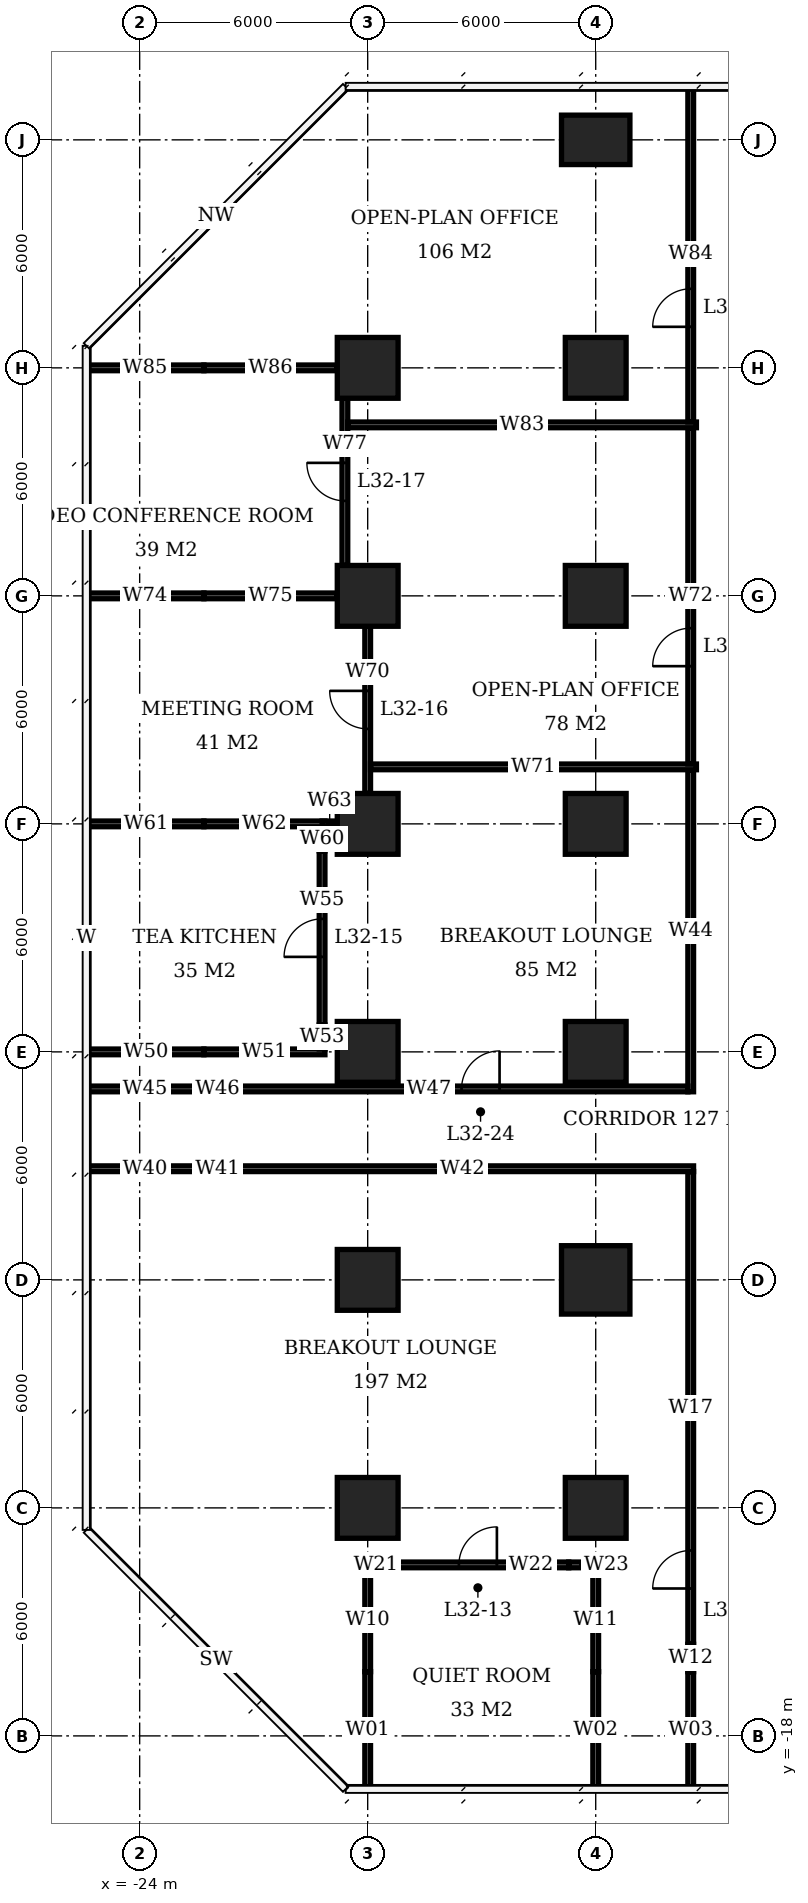
"""IFC4 building model, lengths in metres.
Left out: names, types, materials, properties, quantities, classifications, styles, units other than length and angle.
Written with IfcOpenShell. Run it as: python <this file> out.ifc"""

import sys

from ifc_helpers import new_model, si_unit, direction, frame, frame_2d, origin, origin_2d, place, context, subcontext, project, spatial, rectangle, extrude, element, fill, save


model = new_model("IFC4")
c1 = context("Model", 3, precision=1e-05, world=origin(), true_north=direction((0.0, 1.0)))
c2 = subcontext(c1, "Body", "Model", "MODEL_VIEW")
j1 = project(units=[si_unit("LENGTHUNIT", "METRE"), si_unit("PLANEANGLEUNIT", "RADIAN")], contexts=[c1])
p1 = place(None, origin())
s1 = spatial("IfcSite", under=j1, at=p1, CompositionType="ELEMENT")
p2 = place(p1, origin())
s2 = spatial("IfcBuilding", under=s1, at=p2, CompositionType="ELEMENT")
p3 = place(p2, frame((0.0, 0.0, 132.8)))
s3 = spatial("IfcBuildingStorey", under=s2, at=p3, CompositionType="ELEMENT", Elevation=132.8)
for number, where, z_axis, x_axis in (
    (1, (-18.0, -12.0, 0.0), (0.0, 0.0, 1.0), (1.0, 0.0, 0.0)),
    (2, (-18.0, -6.0, 0.0), (0.0, 0.0, 1.0), (1.0, 0.0, 0.0)),
    (3, (-18.0, 0.0, 0.0), (0.0, 0.0, 1.0), (1.0, 0.0, 0.0)),
    (4, (-18.0, 6.0, 0.0), (0.0, 0.0, 1.0), (1.0, 0.0, 0.0)),
    (5, (-18.0, 12.0, 0.0), (0.0, 0.0, 1.0), (1.0, 0.0, 0.0)),
    (6, (-18.0, 18.0, 0.0), (0.0, 0.0, 1.0), (1.0, 0.0, 0.0)),
    (7, (-12.0, -12.0, 0.0), (0.0, 0.0, 1.0), (1.0, 0.0, 0.0)),
):
    element("IfcColumn", number, at=place(p3, frame(where, z_axis=z_axis, x_axis=x_axis)), inside=s3, PredefinedType="COLUMN", context=c2, shape_type="SweptSolid", body=[
        extrude(rectangle(XDim=1.6, YDim=1.6, at=origin_2d()), origin(), (0.0, 0.0, 1.0), 3.9),
    ])
p4 = place(p3, frame((-12.0, -6.0, 0.0), z_axis=(0.0, 0.0, 1.0), x_axis=(1.0, 0.0, 0.0)))
e8 = element("IfcColumn", 8, at=p4, inside=s3, PredefinedType="COLUMN", context=c2, shape_type="SweptSolid", body=[
    extrude(rectangle(XDim=1.8, YDim=1.8, at=origin_2d()), origin(), (0.0, 0.0, 1.0), 3.9),
])
for number, where, z_axis, x_axis in (
    (9, (-12.0, 0.0, 0.0), (0.0, 0.0, 1.0), (1.0, 0.0, 0.0)),
    (10, (-12.0, 6.0, 0.0), (0.0, 0.0, 1.0), (1.0, 0.0, 0.0)),
    (11, (-12.0, 12.0, 0.0), (0.0, 0.0, 1.0), (1.0, 0.0, 0.0)),
    (12, (-12.0, 18.0, 0.0), (0.0, 0.0, 1.0), (1.0, 0.0, 0.0)),
):
    element("IfcColumn", number, at=place(p3, frame(where, z_axis=z_axis, x_axis=x_axis)), inside=s3, PredefinedType="COLUMN", context=c2, shape_type="SweptSolid", body=[
        extrude(rectangle(XDim=1.6, YDim=1.6, at=origin_2d()), origin(), (0.0, 0.0, 1.0), 3.9),
    ])
p5 = place(p3, frame((-12.0, 24.0, 0.0), z_axis=(0.0, 0.0, 1.0), x_axis=(1.0, 0.0, 0.0)))
e13 = element("IfcColumn", 13, at=p5, inside=s3, PredefinedType="COLUMN", context=c2, shape_type="SweptSolid", body=[
    extrude(rectangle(XDim=1.8, YDim=1.3, at=origin_2d()), origin(), (0.0, 0.0, 1.0), 3.9),
])
p6 = place(p3, frame((-18.075, -13.5, 0.0), z_axis=(0.0, 0.0, 1.0), x_axis=(1.0, 0.0, 0.0)))
e14 = element("IfcWall", 14, at=p6, inside=s3, PredefinedType="PARTITIONING", context=c2, shape_type="SweptSolid", body=[
    extrude(rectangle(XDim=0.585, YDim=0.15, at=frame_2d((0.292, 0.0))), origin(), (0.0, 0.0, 1.0), 2.65),
])
p7 = place(p3, frame((-17.49, -13.5, 0.0), z_axis=(0.0, 0.0, 1.0), x_axis=(1.0, 0.0, 0.0)))
e15 = element("IfcWall", 15, at=p7, inside=s3, PredefinedType="PARTITIONING", context=c2, shape_type="SweptSolid", body=[
    extrude(rectangle(XDim=4.78, YDim=0.15, at=frame_2d((2.39, 0.0))), origin(), (0.0, 0.0, 1.0), 3.65),
])
p8 = place(p7, frame((1.89, 0.0, 0.0)))
e16 = element("IfcOpeningElement", 16, at=p8, cuts=e15, PredefinedType="OPENING", context=c2, shape_type="SweptSolid", body=[
    extrude(rectangle(XDim=1.0, YDim=2.1, at=frame_2d((0.5, 1.05))), frame((0.0, 0.085, 0.0), z_axis=(0.0, -1.0, 0.0), x_axis=(1.0, 0.0, 0.0)), (0.0, 0.0, 1.0), 0.17),
])
p9 = place(p3, frame((-12.71, -13.5, 0.0), z_axis=(0.0, 0.0, 1.0), x_axis=(1.0, 0.0, 0.0)))
e17 = element("IfcWall", 17, at=p9, inside=s3, PredefinedType="PARTITIONING", context=c2, shape_type="SweptSolid", body=[
    extrude(rectangle(XDim=0.785, YDim=0.15, at=frame_2d((0.393, 0.0))), origin(), (0.0, 0.0, 1.0), 2.65),
])
p10 = place(p3, frame((-25.35, 0.0, 0.0), z_axis=(0.0, 0.0, 1.0), x_axis=(1.0, 0.0, 0.0)))
e18 = element("IfcWall", 18, at=p10, inside=s3, PredefinedType="PARTITIONING", context=c2, shape_type="SweptSolid", body=[
    extrude(rectangle(XDim=3.04, YDim=0.15, at=frame_2d((1.52, 0.0))), origin(), (0.0, 0.0, 1.0), 3.65),
])
p11 = place(p3, frame((-22.31, 0.0, 0.0), z_axis=(0.0, 0.0, 1.0), x_axis=(1.0, 0.0, 0.0)))
e19 = element("IfcWall", 19, at=p11, inside=s3, PredefinedType="PARTITIONING", context=c2, shape_type="SweptSolid", body=[
    extrude(rectangle(XDim=3.185, YDim=0.15, at=frame_2d((1.593, 0.0))), origin(), (0.0, 0.0, 1.0), 2.65),
])
p12 = place(p3, frame((-25.35, 6.0, 0.0), z_axis=(0.0, 0.0, 1.0), x_axis=(1.0, 0.0, 0.0)))
e20 = element("IfcWall", 20, at=p12, inside=s3, PredefinedType="PARTITIONING", context=c2, shape_type="SweptSolid", body=[
    extrude(rectangle(XDim=3.04, YDim=0.15, at=frame_2d((1.52, 0.0))), origin(), (0.0, 0.0, 1.0), 3.65),
])
p13 = place(p3, frame((-22.31, 6.0, 0.0), z_axis=(0.0, 0.0, 1.0), x_axis=(1.0, 0.0, 0.0)))
e21 = element("IfcWall", 21, at=p13, inside=s3, PredefinedType="PARTITIONING", context=c2, shape_type="SweptSolid", body=[
    extrude(rectangle(XDim=3.185, YDim=0.15, at=frame_2d((1.593, 0.0))), origin(), (0.0, 0.0, 1.0), 2.65),
])
p14 = place(p3, frame((-19.2, 6.0, 0.0), z_axis=(0.0, 0.0, 1.0), x_axis=(1.0, 0.0, 0.0)))
e22 = element("IfcWall", 22, at=p14, inside=s3, PredefinedType="PARTITIONING", context=c2, shape_type="SweptSolid", body=[
    extrude(rectangle(XDim=0.4, YDim=0.15, at=frame_2d((0.2, 0.0))), origin(), (0.0, 0.0, 1.0), 2.65),
])
p15 = place(p3, frame((-25.4, 12.0, 0.0), z_axis=(0.0, 0.0, 1.0), x_axis=(1.0, 0.0, 0.0)))
e23 = element("IfcWall", 23, at=p15, inside=s3, PredefinedType="PARTITIONING", context=c2, shape_type="SweptSolid", body=[
    extrude(rectangle(XDim=3.09, YDim=0.15, at=frame_2d((1.545, 0.0))), origin(), (0.0, 0.0, 1.0), 3.65),
])
p16 = place(p3, frame((-22.31, 12.0, 0.0), z_axis=(0.0, 0.0, 1.0), x_axis=(1.0, 0.0, 0.0)))
e24 = element("IfcWall", 24, at=p16, inside=s3, PredefinedType="PARTITIONING", context=c2, shape_type="SweptSolid", body=[
    extrude(rectangle(XDim=3.51, YDim=0.15, at=frame_2d((1.755, 0.0))), origin(), (0.0, 0.0, 1.0), 2.65),
])
p17 = place(p3, frame((-25.4, 18.0, 0.0), z_axis=(0.0, 0.0, 1.0), x_axis=(1.0, 0.0, 0.0)))
e25 = element("IfcWall", 25, at=p17, inside=s3, PredefinedType="PARTITIONING", context=c2, shape_type="SweptSolid", body=[
    extrude(rectangle(XDim=3.09, YDim=0.15, at=frame_2d((1.545, 0.0))), origin(), (0.0, 0.0, 1.0), 3.65),
])
p18 = place(p3, frame((-22.31, 18.0, 0.0), z_axis=(0.0, 0.0, 1.0), x_axis=(1.0, 0.0, 0.0)))
e26 = element("IfcWall", 26, at=p18, inside=s3, PredefinedType="PARTITIONING", context=c2, shape_type="SweptSolid", body=[
    extrude(rectangle(XDim=3.51, YDim=0.15, at=frame_2d((1.755, 0.0))), origin(), (0.0, 0.0, 1.0), 2.65),
])
p19 = place(p3, frame((-19.2, 0.075, 0.0), z_axis=(0.0, 0.0, 1.0), x_axis=(0.0, 1.0, 0.0)))
e27 = element("IfcWall", 27, at=p19, inside=s3, PredefinedType="PARTITIONING", context=c2, shape_type="SweptSolid", body=[
    extrude(rectangle(XDim=0.635, YDim=0.15, at=frame_2d((0.317, 0.0))), origin(), (0.0, 0.0, 1.0), 2.65),
])
p20 = place(p3, frame((-19.2, 0.71, 0.0), z_axis=(0.0, 0.0, 1.0), x_axis=(0.0, 1.0, 0.0)))
e28 = element("IfcWall", 28, at=p20, inside=s3, PredefinedType="PARTITIONING", context=c2, shape_type="SweptSolid", body=[
    extrude(rectangle(XDim=4.58, YDim=0.15, at=frame_2d((2.29, 0.0))), origin(), (0.0, 0.0, 1.0), 3.65),
])
p21 = place(p20, frame((1.79, 0.0, 0.0)))
e29 = element("IfcOpeningElement", 29, at=p21, cuts=e28, PredefinedType="OPENING", context=c2, shape_type="SweptSolid", body=[
    extrude(rectangle(XDim=1.0, YDim=2.1, at=frame_2d((0.5, 1.05))), frame((0.0, 0.085, 0.0), z_axis=(0.0, -1.0, 0.0), x_axis=(1.0, 0.0, 0.0)), (0.0, 0.0, 1.0), 0.17),
])
p22 = place(p3, frame((-19.2, 5.29, 0.0), z_axis=(0.0, 0.0, 1.0), x_axis=(0.0, 1.0, 0.0)))
e30 = element("IfcWall", 30, at=p22, inside=s3, PredefinedType="PARTITIONING", context=c2, shape_type="SweptSolid", body=[
    extrude(rectangle(XDim=0.635, YDim=0.15, at=frame_2d((0.317, 0.0))), origin(), (0.0, 0.0, 1.0), 2.65),
])
p23 = place(p3, frame((-18.6, 12.8, 0.0), z_axis=(0.0, 0.0, 1.0), x_axis=(0.0, 1.0, 0.0)))
e31 = element("IfcWall", 31, at=p23, inside=s3, PredefinedType="PARTITIONING", context=c2, shape_type="SweptSolid", body=[
    extrude(rectangle(XDim=4.4, YDim=0.15, at=frame_2d((2.2, 0.0))), origin(), (0.0, 0.0, 1.0), 3.65),
])
p24 = place(p23, frame((1.7, 0.0, 0.0)))
e32 = element("IfcOpeningElement", 32, at=p24, cuts=e31, PredefinedType="OPENING", context=c2, shape_type="SweptSolid", body=[
    extrude(rectangle(XDim=1.0, YDim=2.1, at=frame_2d((0.5, 1.05))), frame((0.0, 0.085, 0.0), z_axis=(0.0, -1.0, 0.0), x_axis=(1.0, 0.0, 0.0)), (0.0, 0.0, 1.0), 0.17),
])
p25 = place(p3, frame((-18.0, -19.4, 0.0), z_axis=(0.0, 0.0, 1.0), x_axis=(0.0, 1.0, 0.0)))
e33 = element("IfcWall", 33, at=p25, inside=s3, PredefinedType="PARTITIONING", context=c2, shape_type="SweptSolid", body=[
    extrude(rectangle(XDim=3.09, YDim=0.15, at=frame_2d((1.545, 0.0))), origin(), (0.0, 0.0, 1.0), 3.65),
])
p26 = place(p3, frame((-18.0, -16.31, 0.0), z_axis=(0.0, 0.0, 1.0), x_axis=(0.0, 1.0, 0.0)))
e34 = element("IfcWall", 34, at=p26, inside=s3, PredefinedType="PARTITIONING", context=c2, shape_type="SweptSolid", body=[
    extrude(rectangle(XDim=2.735, YDim=0.15, at=frame_2d((1.368, 0.0))), origin(), (0.0, 0.0, 1.0), 2.65),
])
p27 = place(p3, frame((-18.0, 6.8, 0.0), z_axis=(0.0, 0.0, 1.0), x_axis=(0.0, 1.0, 0.0)))
e35 = element("IfcWall", 35, at=p27, inside=s3, PredefinedType="PARTITIONING", context=c2, shape_type="SweptSolid", body=[
    extrude(rectangle(XDim=4.4, YDim=0.15, at=frame_2d((2.2, 0.0))), origin(), (0.0, 0.0, 1.0), 3.65),
])
p28 = place(p27, frame((1.7, 0.0, 0.0)))
e36 = element("IfcOpeningElement", 36, at=p28, cuts=e35, PredefinedType="OPENING", context=c2, shape_type="SweptSolid", body=[
    extrude(rectangle(XDim=1.0, YDim=2.1, at=frame_2d((0.5, 1.05))), frame((0.0, 0.085, 0.0), z_axis=(0.0, -1.0, 0.0), x_axis=(1.0, 0.0, 0.0)), (0.0, 0.0, 1.0), 0.17),
])
p29 = place(p3, frame((-12.0, -19.4, 0.0), z_axis=(0.0, 0.0, 1.0), x_axis=(0.0, 1.0, 0.0)))
e37 = element("IfcWall", 37, at=p29, inside=s3, PredefinedType="PARTITIONING", context=c2, shape_type="SweptSolid", body=[
    extrude(rectangle(XDim=3.09, YDim=0.15, at=frame_2d((1.545, 0.0))), origin(), (0.0, 0.0, 1.0), 3.65),
])
p30 = place(p3, frame((-12.0, -16.31, 0.0), z_axis=(0.0, 0.0, 1.0), x_axis=(0.0, 1.0, 0.0)))
e38 = element("IfcWall", 38, at=p30, inside=s3, PredefinedType="PARTITIONING", context=c2, shape_type="SweptSolid", body=[
    extrude(rectangle(XDim=2.735, YDim=0.15, at=frame_2d((1.368, 0.0))), origin(), (0.0, 0.0, 1.0), 2.65),
])
p31 = place(p3, frame((-25.4, -3.075, 0.0), z_axis=(0.0, 0.0, 1.0), x_axis=(1.0, 0.0, 0.0)))
e39 = element("IfcWall", 39, at=p31, inside=s3, PredefinedType="PARTITIONING", context=c2, shape_type="SweptSolid", body=[
    extrude(rectangle(XDim=3.09, YDim=0.15, at=frame_2d((1.545, 0.0))), origin(), (0.0, 0.0, 1.0), 3.65),
])
p32 = place(p3, frame((-22.31, -3.075, 0.0), z_axis=(0.0, 0.0, 1.0), x_axis=(1.0, 0.0, 0.0)))
e40 = element("IfcWall", 40, at=p32, inside=s3, PredefinedType="PARTITIONING", context=c2, shape_type="SweptSolid", body=[
    extrude(rectangle(XDim=0.72, YDim=0.15, at=frame_2d((0.36, 0.0))), origin(), (0.0, 0.0, 1.0), 2.65),
])
p33 = place(p3, frame((-21.59, -3.075, 0.0), z_axis=(0.0, 0.0, 1.0), x_axis=(1.0, 0.0, 0.0)))
e41 = element("IfcWall", 41, at=p33, inside=s3, PredefinedType="PARTITIONING", context=c2, shape_type="SweptSolid", body=[
    extrude(rectangle(XDim=12.165, YDim=0.15, at=frame_2d((6.083, 0.0))), origin(), (0.0, 0.0, 1.0), 3.65),
])
p34 = place(p3, frame((-25.4, -0.975, 0.0), z_axis=(0.0, 0.0, 1.0), x_axis=(1.0, 0.0, 0.0)))
e42 = element("IfcWall", 42, at=p34, inside=s3, PredefinedType="PARTITIONING", context=c2, shape_type="SweptSolid", body=[
    extrude(rectangle(XDim=3.09, YDim=0.15, at=frame_2d((1.545, 0.0))), origin(), (0.0, 0.0, 1.0), 3.65),
])
p35 = place(p3, frame((-22.31, -0.975, 0.0), z_axis=(0.0, 0.0, 1.0), x_axis=(1.0, 0.0, 0.0)))
e43 = element("IfcWall", 43, at=p35, inside=s3, PredefinedType="PARTITIONING", context=c2, shape_type="SweptSolid", body=[
    extrude(rectangle(XDim=0.72, YDim=0.15, at=frame_2d((0.36, 0.0))), origin(), (0.0, 0.0, 1.0), 2.65),
])
p36 = place(p3, frame((-21.59, -0.975, 0.0), z_axis=(0.0, 0.0, 1.0), x_axis=(1.0, 0.0, 0.0)))
e44 = element("IfcWall", 44, at=p36, inside=s3, PredefinedType="PARTITIONING", context=c2, shape_type="SweptSolid", body=[
    extrude(rectangle(XDim=12.015, YDim=0.15, at=frame_2d((6.008, 0.0))), origin(), (0.0, 0.0, 1.0), 3.65),
])
p37 = place(p36, frame((6.06, 0.0, 0.0)))
e45 = element("IfcOpeningElement", 45, at=p37, cuts=e44, PredefinedType="OPENING", context=c2, shape_type="SweptSolid", body=[
    extrude(rectangle(XDim=1.0, YDim=2.1, at=frame_2d((0.5, 1.05))), frame((0.0, 0.085, 0.0), z_axis=(0.0, -1.0, 0.0), x_axis=(1.0, 0.0, 0.0)), (0.0, 0.0, 1.0), 0.17),
])
p38 = place(p3, frame((-18.525, 16.5, 0.0), z_axis=(0.0, 0.0, 1.0), x_axis=(1.0, 0.0, 0.0)))
e46 = element("IfcWall", 46, at=p38, inside=s3, PredefinedType="PARTITIONING", context=c2, shape_type="SweptSolid", body=[
    extrude(rectangle(XDim=9.175, YDim=0.15, at=frame_2d((4.587, 0.0))), origin(), (0.0, 0.0, 1.0), 3.65),
])
p39 = place(p3, frame((-17.925, 7.5, 0.0), z_axis=(0.0, 0.0, 1.0), x_axis=(1.0, 0.0, 0.0)))
e47 = element("IfcWall", 47, at=p39, inside=s3, PredefinedType="PARTITIONING", context=c2, shape_type="SweptSolid", body=[
    extrude(rectangle(XDim=8.575, YDim=0.15, at=frame_2d((4.288, 0.0))), origin(), (0.0, 0.0, 1.0), 3.65),
])
p40 = place(p3, frame((-9.5, -19.4, 0.0), z_axis=(0.0, 0.0, 1.0), x_axis=(0.0, 1.0, 0.0)))
e48 = element("IfcWall", 48, at=p40, inside=s3, PredefinedType="PARTITIONING", context=c2, shape_type="SweptSolid", body=[
    extrude(rectangle(XDim=3.09, YDim=0.15, at=frame_2d((1.545, 0.0))), origin(), (0.0, 0.0, 1.0), 3.65),
])
p41 = place(p3, frame((-9.5, -16.31, 0.0), z_axis=(0.0, 0.0, 1.0), x_axis=(0.0, 1.0, 0.0)))
e49 = element("IfcWall", 49, at=p41, inside=s3, PredefinedType="PARTITIONING", context=c2, shape_type="SweptSolid", body=[
    extrude(rectangle(XDim=0.72, YDim=0.15, at=frame_2d((0.36, 0.0))), origin(), (0.0, 0.0, 1.0), 2.65),
])
p42 = place(p3, frame((-9.5, -15.59, 0.0), z_axis=(0.0, 0.0, 1.0), x_axis=(0.0, 1.0, 0.0)))
e50 = element("IfcWall", 50, at=p42, inside=s3, PredefinedType="PARTITIONING", context=c2, shape_type="SweptSolid", body=[
    extrude(rectangle(XDim=12.44, YDim=0.15, at=frame_2d((6.22, 0.0))), origin(), (0.0, 0.0, 1.0), 3.65),
])
p43 = place(p42, frame((1.469, 0.0, 0.0)))
e51 = element("IfcOpeningElement", 51, at=p43, cuts=e50, PredefinedType="OPENING", context=c2, shape_type="SweptSolid", body=[
    extrude(rectangle(XDim=1.0, YDim=2.1, at=frame_2d((0.5, 1.05))), frame((0.0, 0.085, 0.0), z_axis=(0.0, -1.0, 0.0), x_axis=(1.0, 0.0, 0.0)), (0.0, 0.0, 1.0), 0.17),
])
p44 = place(p3, frame((-9.5, -1.05, 0.0), z_axis=(0.0, 0.0, 1.0), x_axis=(0.0, 1.0, 0.0)))
e52 = element("IfcWall", 52, at=p44, inside=s3, PredefinedType="PARTITIONING", context=c2, shape_type="SweptSolid", body=[
    extrude(rectangle(XDim=8.475, YDim=0.15, at=frame_2d((4.238, 0.0))), origin(), (0.0, 0.0, 1.0), 3.65),
])
p45 = place(p3, frame((-9.5, 7.575, 0.0), z_axis=(0.0, 0.0, 1.0), x_axis=(0.0, 1.0, 0.0)))
e53 = element("IfcWall", 53, at=p45, inside=s3, PredefinedType="PARTITIONING", context=c2, shape_type="SweptSolid", body=[
    extrude(rectangle(XDim=8.85, YDim=0.15, at=frame_2d((4.425, 0.0))), origin(), (0.0, 0.0, 1.0), 3.65),
])
p46 = place(p45, frame((2.575, 0.0, 0.0)))
e54 = element("IfcOpeningElement", 54, at=p46, cuts=e53, PredefinedType="OPENING", context=c2, shape_type="SweptSolid", body=[
    extrude(rectangle(XDim=1.0, YDim=2.1, at=frame_2d((0.5, 1.05))), frame((0.0, 0.085, 0.0), z_axis=(0.0, -1.0, 0.0), x_axis=(1.0, 0.0, 0.0)), (0.0, 0.0, 1.0), 0.17),
])
p47 = place(p3, frame((-9.5, 16.575, 0.0), z_axis=(0.0, 0.0, 1.0), x_axis=(0.0, 1.0, 0.0)))
e55 = element("IfcWall", 55, at=p47, inside=s3, PredefinedType="PARTITIONING", context=c2, shape_type="SweptSolid", body=[
    extrude(rectangle(XDim=8.825, YDim=0.15, at=frame_2d((4.413, 0.0))), origin(), (0.0, 0.0, 1.0), 3.65),
])
p48 = place(p47, frame((2.505, 0.0, 0.0)))
e56 = element("IfcOpeningElement", 56, at=p48, cuts=e55, PredefinedType="OPENING", context=c2, shape_type="SweptSolid", body=[
    extrude(rectangle(XDim=1.0, YDim=2.1, at=frame_2d((0.5, 1.05))), frame((0.0, 0.085, 0.0), z_axis=(0.0, -1.0, 0.0), x_axis=(1.0, 0.0, 0.0)), (0.0, 0.0, 1.0), 0.17),
])
p49 = place(p8, origin())
e57 = element("IfcDoor", 57, at=p49, inside=s3, OperationType="SINGLE_SWING_RIGHT", PredefinedType="DOOR", context=c2, shape_type="SweptSolid", body=[
    extrude(rectangle(XDim=1.0, YDim=2.1, at=frame_2d((0.5, 1.05))), frame((0.0, 0.025, 0.0), z_axis=(0.0, -1.0, 0.0), x_axis=(1.0, 0.0, 0.0)), (0.0, 0.0, 1.0), 0.05),
])
fill(e16, e57)
p50 = place(p21, origin())
e58 = element("IfcDoor", 58, at=p50, inside=s3, OperationType="SINGLE_SWING_LEFT", PredefinedType="DOOR", context=c2, shape_type="SweptSolid", body=[
    extrude(rectangle(XDim=1.0, YDim=2.1, at=frame_2d((0.5, 1.05))), frame((0.0, 0.025, 0.0), z_axis=(0.0, -1.0, 0.0), x_axis=(1.0, 0.0, 0.0)), (0.0, 0.0, 1.0), 0.05),
])
fill(e29, e58)
p51 = place(p28, origin())
e59 = element("IfcDoor", 59, at=p51, inside=s3, OperationType="SINGLE_SWING_RIGHT", PredefinedType="DOOR", context=c2, shape_type="SweptSolid", body=[
    extrude(rectangle(XDim=1.0, YDim=2.1, at=frame_2d((0.5, 1.05))), frame((0.0, 0.025, 0.0), z_axis=(0.0, -1.0, 0.0), x_axis=(1.0, 0.0, 0.0)), (0.0, 0.0, 1.0), 0.05),
])
fill(e36, e59)
p52 = place(p24, origin())
e60 = element("IfcDoor", 60, at=p52, inside=s3, OperationType="SINGLE_SWING_RIGHT", PredefinedType="DOOR", context=c2, shape_type="SweptSolid", body=[
    extrude(rectangle(XDim=1.0, YDim=2.1, at=frame_2d((0.5, 1.05))), frame((0.0, 0.025, 0.0), z_axis=(0.0, -1.0, 0.0), x_axis=(1.0, 0.0, 0.0)), (0.0, 0.0, 1.0), 0.05),
])
fill(e32, e60)
p53 = place(p43, origin())
e61 = element("IfcDoor", 61, at=p53, inside=s3, OperationType="SINGLE_SWING_LEFT", PredefinedType="DOOR", context=c2, shape_type="SweptSolid", body=[
    extrude(rectangle(XDim=1.0, YDim=2.1, at=frame_2d((0.5, 1.05))), frame((0.0, 0.025, 0.0), z_axis=(0.0, -1.0, 0.0), x_axis=(1.0, 0.0, 0.0)), (0.0, 0.0, 1.0), 0.05),
])
fill(e51, e61)
p54 = place(p37, origin())
e62 = element("IfcDoor", 62, at=p54, inside=s3, OperationType="SINGLE_SWING_RIGHT", PredefinedType="DOOR", context=c2, shape_type="SweptSolid", body=[
    extrude(rectangle(XDim=1.0, YDim=2.1, at=frame_2d((0.5, 1.05))), frame((0.0, 0.025, 0.0), z_axis=(0.0, -1.0, 0.0), x_axis=(1.0, 0.0, 0.0)), (0.0, 0.0, 1.0), 0.05),
])
fill(e45, e62)
p55 = place(p46, origin())
e63 = element("IfcDoor", 63, at=p55, inside=s3, OperationType="SINGLE_SWING_LEFT", PredefinedType="DOOR", context=c2, shape_type="SweptSolid", body=[
    extrude(rectangle(XDim=1.0, YDim=2.1, at=frame_2d((0.5, 1.05))), frame((0.0, 0.025, 0.0), z_axis=(0.0, -1.0, 0.0), x_axis=(1.0, 0.0, 0.0)), (0.0, 0.0, 1.0), 0.05),
])
fill(e54, e63)
p56 = place(p48, origin())
e64 = element("IfcDoor", 64, at=p56, inside=s3, OperationType="SINGLE_SWING_LEFT", PredefinedType="DOOR", context=c2, shape_type="SweptSolid", body=[
    extrude(rectangle(XDim=1.0, YDim=2.1, at=frame_2d((0.5, 1.05))), frame((0.0, 0.025, 0.0), z_axis=(0.0, -1.0, 0.0), x_axis=(1.0, 0.0, 0.0)), (0.0, 0.0, 1.0), 0.05),
])
fill(e56, e64)
save(model, sys.argv[1])
